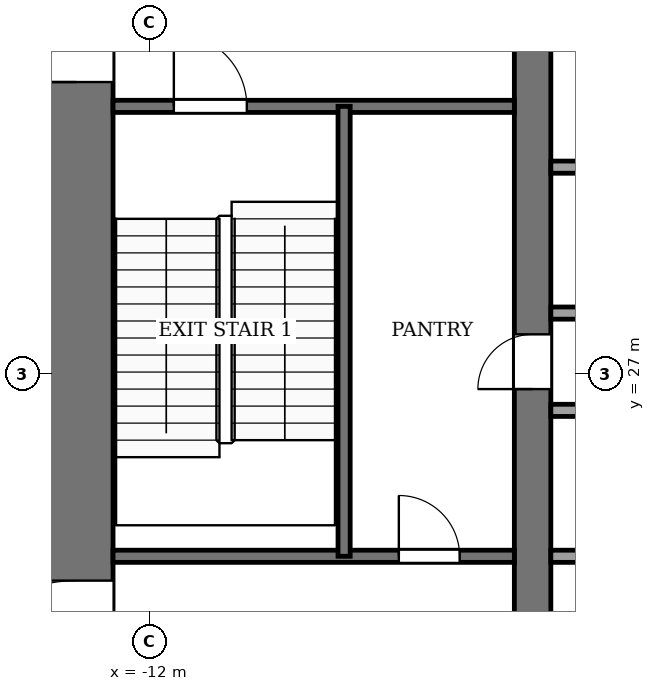
"""IFC4 building model, lengths in metres.
Left out: names, types, materials, properties, quantities, classifications, styles, units other than length and angle.
Written with IfcOpenShell. Run it as: python <this file> out.ifc"""

import sys

from ifc_helpers import new_model, si_unit, direction, frame, frame_2d, origin, place, context, subcontext, project, spatial, rectangle, extrude, element, fill, save


model = new_model("IFC4")
c1 = context("Model", 3, precision=1e-05, world=origin(), true_north=direction((0.0, 1.0)))
c2 = subcontext(c1, "Body", "Model", "MODEL_VIEW")
j1 = project(units=[si_unit("LENGTHUNIT", "METRE"), si_unit("PLANEANGLEUNIT", "RADIAN")], contexts=[c1])
p1 = place(None, origin())
s1 = spatial("IfcSite", under=j1, at=p1, CompositionType="ELEMENT")
p2 = place(p1, origin())
s2 = spatial("IfcBuilding", under=s1, at=p2, CompositionType="ELEMENT")
p3 = place(p2, frame((0.0, 0.0, 65.0)))
s3 = spatial("IfcBuildingStorey", under=s2, at=p3, CompositionType="ELEMENT", Elevation=65.0)
p4 = place(p3, frame((-13.2, 18.4, -0.13), z_axis=(0.0, 0.0, 1.0), x_axis=(0.0, 1.0, 0.0)))
e1 = element("IfcWall", 1, at=p4, inside=s3, PredefinedType="SHEAR", context=c2, shape_type="SweptSolid", body=[
    extrude(rectangle(XDim=19.2, YDim=1.2, at=frame_2d((9.6, 0.0))), origin(), (0.0, 0.0, 1.0), 5.0),
])
p5 = place(p4, frame((2.8, 0.0, 0.13)))
e2 = element("IfcOpeningElement", 2, at=p5, cuts=e1, PredefinedType="OPENING", context=c2, shape_type="SweptSolid", body=[
    extrude(rectangle(XDim=2.4, YDim=2.4, at=frame_2d((1.2, 1.2))), frame((0.0, 0.61, 0.0), z_axis=(0.0, -1.0, 0.0), x_axis=(1.0, 0.0, 0.0)), (0.0, 0.0, 1.0), 1.22),
])
p6 = place(p4, frame((13.4, 0.0, 0.13)))
e3 = element("IfcOpeningElement", 3, at=p6, cuts=e1, PredefinedType="OPENING", context=c2, shape_type="SweptSolid", body=[
    extrude(rectangle(XDim=1.4, YDim=2.2, at=frame_2d((0.7, 1.1))), frame((0.0, 0.61, 0.0), z_axis=(0.0, -1.0, 0.0), x_axis=(1.0, 0.0, 0.0)), (0.0, 0.0, 1.0), 1.22),
])
p7 = place(p3, frame((-5.7, 18.4, -0.13), z_axis=(0.0, 0.0, 1.0), x_axis=(0.0, 1.0, 0.0)))
e4 = element("IfcWall", 4, at=p7, inside=s3, PredefinedType="SHEAR", context=c2, shape_type="SweptSolid", body=[
    extrude(rectangle(XDim=19.2, YDim=0.6, at=frame_2d((9.6, 0.0))), origin(), (0.0, 0.0, 1.0), 5.0),
])
p8 = place(p7, frame((8.35, 0.0, 0.13)))
e5 = element("IfcOpeningElement", 5, at=p8, cuts=e4, PredefinedType="OPENING", context=c2, shape_type="SweptSolid", body=[
    extrude(rectangle(XDim=0.9, YDim=2.1, at=frame_2d((0.45, 1.05))), frame((0.0, 0.31, 0.0), z_axis=(0.0, -1.0, 0.0), x_axis=(1.0, 0.0, 0.0)), (0.0, 0.0, 1.0), 0.62),
])
p9 = place(p3, frame((-12.6, 24.0, 0.0), z_axis=(0.0, 0.0, 1.0), x_axis=(1.0, 0.0, 0.0)))
e6 = element("IfcWall", 6, at=p9, inside=s3, PredefinedType="PARTITIONING", context=c2, shape_type="SweptSolid", body=[
    extrude(rectangle(XDim=6.6, YDim=0.2, at=frame_2d((3.3, 0.0))), origin(), (0.0, 0.0, 1.0), 4.87),
])
p10 = place(p9, frame((4.7, 0.0, 0.0)))
e7 = element("IfcOpeningElement", 7, at=p10, cuts=e6, PredefinedType="OPENING", context=c2, shape_type="SweptSolid", body=[
    extrude(rectangle(XDim=1.0, YDim=2.1, at=frame_2d((0.5, 1.05))), frame((0.0, 0.11, 0.0), z_axis=(0.0, -1.0, 0.0), x_axis=(1.0, 0.0, 0.0)), (0.0, 0.0, 1.0), 0.22),
])
p11 = place(p3, frame((-5.4, 24.0, 0.0), z_axis=(0.0, 0.0, 1.0), x_axis=(1.0, 0.0, 0.0)))
e8 = element("IfcWall", 8, at=p11, inside=s3, PredefinedType="PARTITIONING", context=c2, shape_type="SweptSolid", body=[
    extrude(rectangle(XDim=10.8, YDim=0.2, at=frame_2d((5.4, 0.0))), origin(), (0.0, 0.0, 1.0), 4.87),
])
p12 = place(p11, frame((0.75, 0.0, 0.0)))
e9 = element("IfcOpeningElement", 9, at=p12, cuts=e8, PredefinedType="OPENING", context=c2, shape_type="SweptSolid", body=[
    extrude(rectangle(XDim=1.2, YDim=2.2, at=frame_2d((0.6, 1.1))), frame((0.0, 0.11, 0.0), z_axis=(0.0, -1.0, 0.0), x_axis=(1.0, 0.0, 0.0)), (0.0, 0.0, 1.0), 0.22),
])
p13 = place(p11, frame((3.45, 0.0, 0.0)))
e10 = element("IfcOpeningElement", 10, at=p13, cuts=e8, PredefinedType="OPENING", context=c2, shape_type="SweptSolid", body=[
    extrude(rectangle(XDim=1.2, YDim=2.2, at=frame_2d((0.6, 1.1))), frame((0.0, 0.11, 0.0), z_axis=(0.0, -1.0, 0.0), x_axis=(1.0, 0.0, 0.0)), (0.0, 0.0, 1.0), 0.22),
])
p14 = place(p11, frame((6.15, 0.0, 0.0)))
e11 = element("IfcOpeningElement", 11, at=p14, cuts=e8, PredefinedType="OPENING", context=c2, shape_type="SweptSolid", body=[
    extrude(rectangle(XDim=1.2, YDim=2.2, at=frame_2d((0.6, 1.1))), frame((0.0, 0.11, 0.0), z_axis=(0.0, -1.0, 0.0), x_axis=(1.0, 0.0, 0.0)), (0.0, 0.0, 1.0), 0.22),
])
p15 = place(p11, frame((8.85, 0.0, 0.0)))
e12 = element("IfcOpeningElement", 12, at=p15, cuts=e8, PredefinedType="OPENING", context=c2, shape_type="SweptSolid", body=[
    extrude(rectangle(XDim=1.2, YDim=2.2, at=frame_2d((0.6, 1.1))), frame((0.0, 0.11, 0.0), z_axis=(0.0, -1.0, 0.0), x_axis=(1.0, 0.0, 0.0)), (0.0, 0.0, 1.0), 0.22),
])
for number, where, z_axis, x_axis in (
    (13, (-5.4, 26.4, 0.0), (0.0, 0.0, 1.0), (1.0, 0.0, 0.0)),
    (14, (-5.4, 28.0, 0.0), (0.0, 0.0, 1.0), (1.0, 0.0, 0.0)),
    (15, (-5.4, 30.4, 0.0), (0.0, 0.0, 1.0), (1.0, 0.0, 0.0)),
):
    element("IfcWall", number, at=place(p3, frame(where, z_axis=z_axis, x_axis=x_axis)), inside=s3, PredefinedType="PARTITIONING", context=c2, shape_type="SweptSolid", body=[
        extrude(rectangle(XDim=10.8, YDim=0.2, at=frame_2d((5.4, 0.0))), origin(), (0.0, 0.0, 1.0), 4.87),
    ])
p16 = place(p3, frame((-12.6, 31.4, 0.0), z_axis=(0.0, 0.0, 1.0), x_axis=(1.0, 0.0, 0.0)))
e16 = element("IfcWall", 16, at=p16, inside=s3, PredefinedType="PARTITIONING", context=c2, shape_type="SweptSolid", body=[
    extrude(rectangle(XDim=6.6, YDim=0.2, at=frame_2d((3.3, 0.0))), origin(), (0.0, 0.0, 1.0), 4.87),
])
p17 = place(p16, frame((1.0, 0.0, 0.0)))
e17 = element("IfcOpeningElement", 17, at=p17, cuts=e16, PredefinedType="OPENING", context=c2, shape_type="SweptSolid", body=[
    extrude(rectangle(XDim=1.2, YDim=2.2, at=frame_2d((0.6, 1.1))), frame((0.0, 0.11, 0.0), z_axis=(0.0, -1.0, 0.0), x_axis=(1.0, 0.0, 0.0)), (0.0, 0.0, 1.0), 0.22),
])
p18 = place(p3, frame((-8.8, 24.0, 0.0), z_axis=(0.0, 0.0, 1.0), x_axis=(0.0, 1.0, 0.0)))
e18 = element("IfcWall", 18, at=p18, inside=s3, PredefinedType="PARTITIONING", context=c2, shape_type="SweptSolid", body=[
    extrude(rectangle(XDim=7.4, YDim=0.2, at=frame_2d((3.7, 0.0))), origin(), (0.0, 0.0, 1.0), 4.87),
])
p19 = place(p10, origin())
e19 = element("IfcDoor", 19, at=p19, inside=s3, OperationType="SINGLE_SWING_RIGHT", PredefinedType="DOOR", context=c2, shape_type="SweptSolid", body=[
    extrude(rectangle(XDim=1.0, YDim=2.1, at=frame_2d((0.5, 1.05))), frame((0.0, 0.025, 0.0), z_axis=(0.0, -1.0, 0.0), x_axis=(1.0, 0.0, 0.0)), (0.0, 0.0, 1.0), 0.05),
])
fill(e7, e19)
p20 = place(p8, origin())
e20 = element("IfcDoor", 20, at=p20, inside=s3, OperationType="SINGLE_SWING_LEFT", PredefinedType="DOOR", context=c2, shape_type="SweptSolid", body=[
    extrude(rectangle(XDim=0.9, YDim=2.1, at=frame_2d((0.45, 1.05))), frame((0.0, 0.025, 0.0), z_axis=(0.0, -1.0, 0.0), x_axis=(1.0, 0.0, 0.0)), (0.0, 0.0, 1.0), 0.05),
])
fill(e5, e20)
p21 = place(p17, origin())
e21 = element("IfcDoor", 21, at=p21, inside=s3, OperationType="SINGLE_SWING_LEFT", PredefinedType="DOOR", context=c2, shape_type="SweptSolid", body=[
    extrude(rectangle(XDim=1.2, YDim=2.2, at=frame_2d((0.6, 1.1))), frame((0.0, 0.025, 0.0), z_axis=(0.0, -1.0, 0.0), x_axis=(1.0, 0.0, 0.0)), (0.0, 0.0, 1.0), 0.05),
])
fill(e17, e21)
p22 = place(p5, origin())
e22 = element("IfcDoor", 22, at=p22, inside=s3, OperationType="DOUBLE_DOOR_SINGLE_SWING", PredefinedType="DOOR", context=c2, shape_type="SweptSolid", body=[
    extrude(rectangle(XDim=2.4, YDim=2.4, at=frame_2d((1.2, 1.2))), frame((0.0, 0.025, 0.0), z_axis=(0.0, -1.0, 0.0), x_axis=(1.0, 0.0, 0.0)), (0.0, 0.0, 1.0), 0.05),
])
fill(e2, e22)
p23 = place(p6, origin())
e23 = element("IfcDoor", 23, at=p23, inside=s3, OperationType="SINGLE_SWING_LEFT", PredefinedType="DOOR", context=c2, shape_type="SweptSolid", body=[
    extrude(rectangle(XDim=1.4, YDim=2.2, at=frame_2d((0.7, 1.1))), frame((0.0, 0.025, 0.0), z_axis=(0.0, -1.0, 0.0), x_axis=(1.0, 0.0, 0.0)), (0.0, 0.0, 1.0), 0.05),
])
fill(e3, e23)
save(model, sys.argv[1])
